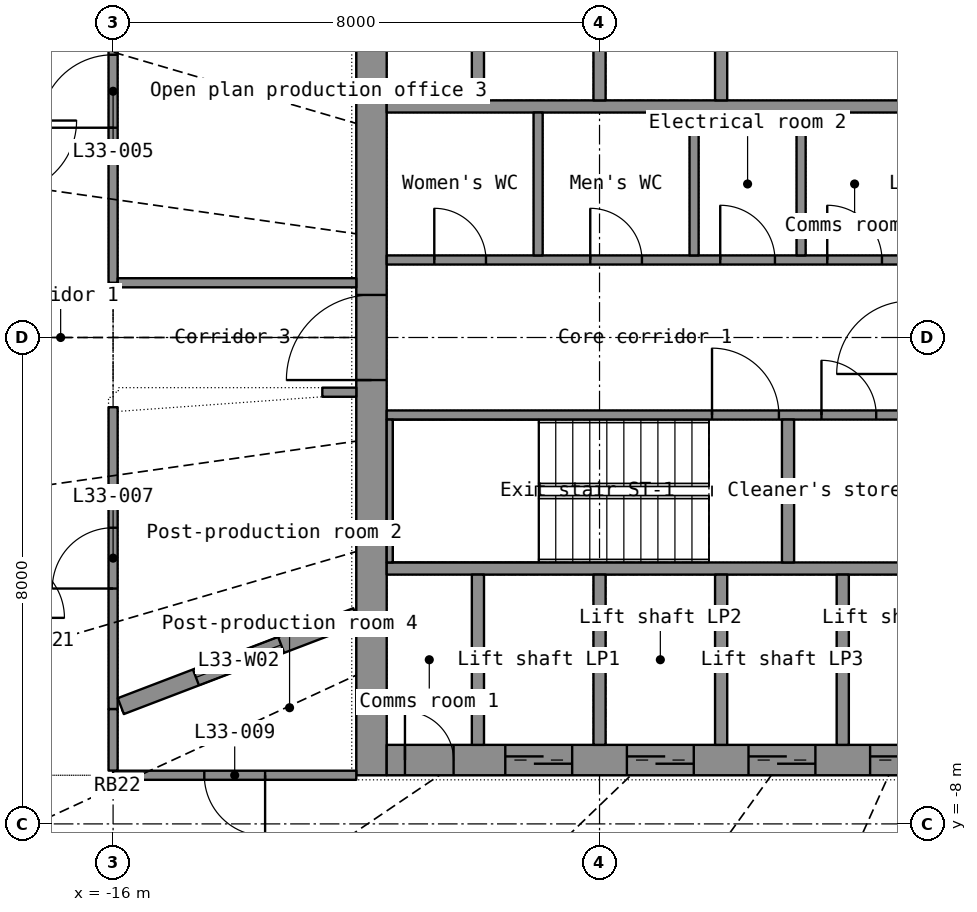
"""IFC4 building model, lengths in metres.
Left out: names, types, materials, properties, quantities, classifications, styles, units other than length and angle.
Written with IfcOpenShell. Run it as: python <this file> out.ifc"""

import sys

from ifc_helpers import new_model, si_unit, direction, frame, frame_2d, origin, place, context, subcontext, project, spatial, rectangle, extrude, element, fill, save


model = new_model("IFC4")
c1 = context("Model", 3, precision=1e-05, world=origin(), true_north=direction((0.0, 1.0)))
c2 = subcontext(c1, "Body", "Model", "MODEL_VIEW")
j1 = project(units=[si_unit("LENGTHUNIT", "METRE"), si_unit("PLANEANGLEUNIT", "RADIAN")], contexts=[c1])
p1 = place(None, origin())
s1 = spatial("IfcSite", under=j1, at=p1, CompositionType="ELEMENT")
p2 = place(p1, origin())
s2 = spatial("IfcBuilding", under=s1, at=p2, CompositionType="ELEMENT")
p3 = place(p2, frame((0.0, 0.0, 137.8)))
s3 = spatial("IfcBuildingStorey", under=s2, at=p3, CompositionType="ELEMENT", Elevation=137.8)
p4 = place(p3, frame((-11.75, -7.2, 0.0), z_axis=(0.0, 0.0, 1.0), x_axis=(0.0, 1.0, 0.0)))
e1 = element("IfcWall", 1, at=p4, inside=s3, PredefinedType="SHEAR", context=c2, shape_type="SweptSolid", body=[
    extrude(rectangle(XDim=14.4, YDim=0.5, at=frame_2d((7.2, 0.0))), origin(), (0.0, 0.0, 1.0), 3.3),
])
p5 = place(p4, frame((6.5, 0.0, 0.0)))
e2 = element("IfcOpeningElement", 2, at=p5, cuts=e1, PredefinedType="OPENING", context=c2, shape_type="SweptSolid", body=[
    extrude(rectangle(XDim=1.4, YDim=2.2, at=frame_2d((0.7, 1.1))), frame((0.0, 0.26, 0.0), z_axis=(0.0, -1.0, 0.0), x_axis=(1.0, 0.0, 0.0)), (0.0, 0.0, 1.0), 0.52),
])
p6 = place(p3, frame((-11.5, -6.95, 0.0), z_axis=(0.0, 0.0, 1.0), x_axis=(1.0, 0.0, 0.0)))
e3 = element("IfcWall", 3, at=p6, inside=s3, PredefinedType="SHEAR", context=c2, shape_type="SweptSolid", body=[
    extrude(rectangle(XDim=23.0, YDim=0.5, at=frame_2d((11.5, 0.0))), origin(), (0.0, 0.0, 1.0), 3.3),
])
p7 = place(p6, frame((1.95, 0.0, 0.0)))
e4 = element("IfcOpeningElement", 4, at=p7, cuts=e3, PredefinedType="OPENING", context=c2, shape_type="SweptSolid", body=[
    extrude(rectangle(XDim=1.1, YDim=2.2, at=frame_2d((0.55, 1.1))), frame((0.0, 0.26, 0.0), z_axis=(0.0, -1.0, 0.0), x_axis=(1.0, 0.0, 0.0)), (0.0, 0.0, 1.0), 0.52),
])
p8 = place(p6, frame((3.95, 0.0, 0.0)))
e5 = element("IfcOpeningElement", 5, at=p8, cuts=e3, PredefinedType="OPENING", context=c2, shape_type="SweptSolid", body=[
    extrude(rectangle(XDim=1.1, YDim=2.2, at=frame_2d((0.55, 1.1))), frame((0.0, 0.26, 0.0), z_axis=(0.0, -1.0, 0.0), x_axis=(1.0, 0.0, 0.0)), (0.0, 0.0, 1.0), 0.52),
])
p9 = place(p6, frame((5.95, 0.0, 0.0)))
e6 = element("IfcOpeningElement", 6, at=p9, cuts=e3, PredefinedType="OPENING", context=c2, shape_type="SweptSolid", body=[
    extrude(rectangle(XDim=1.1, YDim=2.2, at=frame_2d((0.55, 1.1))), frame((0.0, 0.26, 0.0), z_axis=(0.0, -1.0, 0.0), x_axis=(1.0, 0.0, 0.0)), (0.0, 0.0, 1.0), 0.52),
])
p10 = place(p6, frame((7.95, 0.0, 0.0)))
e7 = element("IfcOpeningElement", 7, at=p10, cuts=e3, PredefinedType="OPENING", context=c2, shape_type="SweptSolid", body=[
    extrude(rectangle(XDim=1.1, YDim=2.2, at=frame_2d((0.55, 1.1))), frame((0.0, 0.26, 0.0), z_axis=(0.0, -1.0, 0.0), x_axis=(1.0, 0.0, 0.0)), (0.0, 0.0, 1.0), 0.52),
])
p11 = place(p6, frame((9.95, 0.0, 0.0)))
e8 = element("IfcOpeningElement", 8, at=p11, cuts=e3, PredefinedType="OPENING", context=c2, shape_type="SweptSolid", body=[
    extrude(rectangle(XDim=1.1, YDim=2.2, at=frame_2d((0.55, 1.1))), frame((0.0, 0.26, 0.0), z_axis=(0.0, -1.0, 0.0), x_axis=(1.0, 0.0, 0.0)), (0.0, 0.0, 1.0), 0.52),
])
p12 = place(p6, frame((11.95, 0.0, 0.0)))
e9 = element("IfcOpeningElement", 9, at=p12, cuts=e3, PredefinedType="OPENING", context=c2, shape_type="SweptSolid", body=[
    extrude(rectangle(XDim=1.1, YDim=2.2, at=frame_2d((0.55, 1.1))), frame((0.0, 0.26, 0.0), z_axis=(0.0, -1.0, 0.0), x_axis=(1.0, 0.0, 0.0)), (0.0, 0.0, 1.0), 0.52),
])
p13 = place(p6, frame((13.95, 0.0, 0.0)))
e10 = element("IfcOpeningElement", 10, at=p13, cuts=e3, PredefinedType="OPENING", context=c2, shape_type="SweptSolid", body=[
    extrude(rectangle(XDim=1.1, YDim=2.2, at=frame_2d((0.55, 1.1))), frame((0.0, 0.26, 0.0), z_axis=(0.0, -1.0, 0.0), x_axis=(1.0, 0.0, 0.0)), (0.0, 0.0, 1.0), 0.52),
])
p14 = place(p6, frame((15.95, 0.0, 0.0)))
e11 = element("IfcOpeningElement", 11, at=p14, cuts=e3, PredefinedType="OPENING", context=c2, shape_type="SweptSolid", body=[
    extrude(rectangle(XDim=1.1, YDim=2.2, at=frame_2d((0.55, 1.1))), frame((0.0, 0.26, 0.0), z_axis=(0.0, -1.0, 0.0), x_axis=(1.0, 0.0, 0.0)), (0.0, 0.0, 1.0), 0.52),
])
p15 = place(p6, frame((19.95, 0.0, 0.0)))
e12 = element("IfcOpeningElement", 12, at=p15, cuts=e3, PredefinedType="OPENING", context=c2, shape_type="SweptSolid", body=[
    extrude(rectangle(XDim=1.1, YDim=2.2, at=frame_2d((0.55, 1.1))), frame((0.0, 0.26, 0.0), z_axis=(0.0, -1.0, 0.0), x_axis=(1.0, 0.0, 0.0)), (0.0, 0.0, 1.0), 0.52),
])
p16 = place(p6, frame((0.3, 0.0, 0.0)))
e13 = element("IfcOpeningElement", 13, at=p16, cuts=e3, PredefinedType="OPENING", context=c2, shape_type="SweptSolid", body=[
    extrude(rectangle(XDim=0.8, YDim=2.05, at=frame_2d((0.4, 1.025))), frame((0.0, 0.26, 0.0), z_axis=(0.0, -1.0, 0.0), x_axis=(1.0, 0.0, 0.0)), (0.0, 0.0, 1.0), 0.52),
])
p17 = place(p6, frame((21.9, 0.0, 0.0)))
e14 = element("IfcOpeningElement", 14, at=p17, cuts=e3, PredefinedType="OPENING", context=c2, shape_type="SweptSolid", body=[
    extrude(rectangle(XDim=0.8, YDim=2.05, at=frame_2d((0.4, 1.025))), frame((0.0, 0.26, 0.0), z_axis=(0.0, -1.0, 0.0), x_axis=(1.0, 0.0, 0.0)), (0.0, 0.0, 1.0), 0.52),
])
for number, where, z_axis, x_axis in (
    (15, (-11.5, -3.8, 0.0), (0.0, 0.0, 1.0), (1.0, 0.0, 0.0)),
    (16, (-11.5, 3.8, 0.0), (0.0, 0.0, 1.0), (1.0, 0.0, 0.0)),
):
    element("IfcWall", number, at=place(p3, frame(where, z_axis=z_axis, x_axis=x_axis)), inside=s3, PredefinedType="SHEAR", context=c2, shape_type="SweptSolid", body=[
        extrude(rectangle(XDim=23.0, YDim=0.2, at=frame_2d((11.5, 0.0))), origin(), (0.0, 0.0, 1.0), 3.3),
    ])
for number, where, z_axis, x_axis in (
    (17, (-10.0, -6.7, 0.0), (0.0, 0.0, 1.0), (0.0, 1.0, 0.0)),
    (18, (-8.0, -6.7, 0.0), (0.0, 0.0, 1.0), (0.0, 1.0, 0.0)),
    (19, (-6.0, -6.7, 0.0), (0.0, 0.0, 1.0), (0.0, 1.0, 0.0)),
    (20, (-4.0, -6.7, 0.0), (0.0, 0.0, 1.0), (0.0, 1.0, 0.0)),
    (21, (-10.0, 3.9, 0.0), (0.0, 0.0, 1.0), (0.0, 1.0, 0.0)),
    (22, (-8.0, 3.9, 0.0), (0.0, 0.0, 1.0), (0.0, 1.0, 0.0)),
    (23, (-6.0, 3.9, 0.0), (0.0, 0.0, 1.0), (0.0, 1.0, 0.0)),
):
    element("IfcWall", number, at=place(p3, frame(where, z_axis=z_axis, x_axis=x_axis)), inside=s3, PredefinedType="SHEAR", context=c2, shape_type="SweptSolid", body=[
        extrude(rectangle(XDim=2.8, YDim=0.2, at=frame_2d((1.4, 0.0))), origin(), (0.0, 0.0, 1.0), 3.3),
    ])
p18 = place(p3, frame((-11.5, -1.275, 0.0), z_axis=(0.0, 0.0, 1.0), x_axis=(1.0, 0.0, 0.0)))
e24 = element("IfcWall", 24, at=p18, inside=s3, PredefinedType="SHEAR", context=c2, shape_type="SweptSolid", body=[
    extrude(rectangle(XDim=8.5, YDim=0.15, at=frame_2d((4.25, 0.0))), origin(), (0.0, 0.0, 1.0), 3.3),
])
p19 = place(p18, frame((5.35, 0.0, 0.0)))
e25 = element("IfcOpeningElement", 25, at=p19, cuts=e24, PredefinedType="OPENING", context=c2, shape_type="SweptSolid", body=[
    extrude(rectangle(XDim=1.1, YDim=2.15, at=frame_2d((0.55, 1.075))), frame((0.0, 0.085, 0.0), z_axis=(0.0, -1.0, 0.0), x_axis=(1.0, 0.0, 0.0)), (0.0, 0.0, 1.0), 0.17),
])
p20 = place(p18, frame((7.15, 0.0, 0.0)))
e26 = element("IfcOpeningElement", 26, at=p20, cuts=e24, PredefinedType="OPENING", context=c2, shape_type="SweptSolid", body=[
    extrude(rectangle(XDim=0.9, YDim=2.1, at=frame_2d((0.45, 1.05))), frame((0.0, 0.085, 0.0), z_axis=(0.0, -1.0, 0.0), x_axis=(1.0, 0.0, 0.0)), (0.0, 0.0, 1.0), 0.17),
])
p21 = place(p3, frame((-11.5, 1.275, 0.0), z_axis=(0.0, 0.0, 1.0), x_axis=(1.0, 0.0, 0.0)))
e27 = element("IfcWall", 27, at=p21, inside=s3, PredefinedType="PARTITIONING", context=c2, shape_type="SweptSolid", body=[
    extrude(rectangle(XDim=8.5, YDim=0.15, at=frame_2d((4.25, 0.0))), origin(), (0.0, 0.0, 1.0), 3.3),
])
p22 = place(p21, frame((0.782, 0.0, 0.0)))
e28 = element("IfcOpeningElement", 28, at=p22, cuts=e27, PredefinedType="OPENING", context=c2, shape_type="SweptSolid", body=[
    extrude(rectangle(XDim=0.85, YDim=2.1, at=frame_2d((0.425, 1.05))), frame((0.0, 0.085, 0.0), z_axis=(0.0, -1.0, 0.0), x_axis=(1.0, 0.0, 0.0)), (0.0, 0.0, 1.0), 0.17),
])
p23 = place(p21, frame((3.347, 0.0, 0.0)))
e29 = element("IfcOpeningElement", 29, at=p23, cuts=e27, PredefinedType="OPENING", context=c2, shape_type="SweptSolid", body=[
    extrude(rectangle(XDim=0.85, YDim=2.1, at=frame_2d((0.425, 1.05))), frame((0.0, 0.085, 0.0), z_axis=(0.0, -1.0, 0.0), x_axis=(1.0, 0.0, 0.0)), (0.0, 0.0, 1.0), 0.17),
])
p24 = place(p21, frame((5.485, 0.0, 0.0)))
e30 = element("IfcOpeningElement", 30, at=p24, cuts=e27, PredefinedType="OPENING", context=c2, shape_type="SweptSolid", body=[
    extrude(rectangle(XDim=0.9, YDim=2.1, at=frame_2d((0.45, 1.05))), frame((0.0, 0.085, 0.0), z_axis=(0.0, -1.0, 0.0), x_axis=(1.0, 0.0, 0.0)), (0.0, 0.0, 1.0), 0.17),
])
p25 = place(p21, frame((7.245, 0.0, 0.0)))
e31 = element("IfcOpeningElement", 31, at=p25, cuts=e27, PredefinedType="OPENING", context=c2, shape_type="SweptSolid", body=[
    extrude(rectangle(XDim=0.9, YDim=2.1, at=frame_2d((0.45, 1.05))), frame((0.0, 0.085, 0.0), z_axis=(0.0, -1.0, 0.0), x_axis=(1.0, 0.0, 0.0)), (0.0, 0.0, 1.0), 0.17),
])
p26 = place(p3, frame((-11.45, -3.7, 0.0), z_axis=(0.0, 0.0, 1.0), x_axis=(0.0, 1.0, 0.0)))
e32 = element("IfcWall", 32, at=p26, inside=s3, PredefinedType="SHEAR", context=c2, shape_type="SweptSolid", body=[
    extrude(rectangle(XDim=2.35, YDim=0.1, at=frame_2d((1.175, 0.0))), origin(), (0.0, 0.0, 1.0), 3.3),
])
p27 = place(p3, frame((-4.9, -3.7, 0.0), z_axis=(0.0, 0.0, 1.0), x_axis=(0.0, 1.0, 0.0)))
e33 = element("IfcWall", 33, at=p27, inside=s3, PredefinedType="SHEAR", context=c2, shape_type="SweptSolid", body=[
    extrude(rectangle(XDim=2.35, YDim=0.2, at=frame_2d((1.175, 0.0))), origin(), (0.0, 0.0, 1.0), 3.3),
])
for number, where, z_axis, x_axis in (
    (34, (-9.01, 1.35, 0.0), (0.0, 0.0, 1.0), (0.0, 1.0, 0.0)),
    (35, (-6.445, 1.35, 0.0), (0.0, 0.0, 1.0), (0.0, 1.0, 0.0)),
    (36, (-4.685, 1.35, 0.0), (0.0, 0.0, 1.0), (0.0, 1.0, 0.0)),
):
    element("IfcWall", number, at=place(p3, frame(where, z_axis=z_axis, x_axis=x_axis)), inside=s3, PredefinedType="PARTITIONING", context=c2, shape_type="SweptSolid", body=[
        extrude(rectangle(XDim=2.35, YDim=0.15, at=frame_2d((1.175, 0.0))), origin(), (0.0, 0.0, 1.0), 3.3),
    ])
p28 = place(p3, frame((-16.0, 0.9, 0.0), z_axis=(0.0, 0.0, 1.0), x_axis=(0.0, 1.0, 0.0)))
e37 = element("IfcWall", 37, at=p28, inside=s3, PredefinedType="PARTITIONING", context=c2, shape_type="SweptSolid", body=[
    extrude(rectangle(XDim=6.3, YDim=0.15, at=frame_2d((3.15, 0.0))), origin(), (0.0, 0.0, 1.0), 2.4),
])
p29 = place(p28, frame((2.55, 0.0, 0.0)))
e38 = element("IfcOpeningElement", 38, at=p29, cuts=e37, PredefinedType="OPENING", context=c2, shape_type="SweptSolid", body=[
    extrude(rectangle(XDim=1.2, YDim=2.2, at=frame_2d((0.6, 1.1))), frame((0.0, 0.085, 0.0), z_axis=(0.0, -1.0, 0.0), x_axis=(1.0, 0.0, 0.0)), (0.0, 0.0, 1.0), 0.17),
])
p30 = place(p3, frame((-16.0, -6.111, 0.0), z_axis=(0.0, 0.0, 1.0), x_axis=(0.0, 1.0, 0.0)))
e39 = element("IfcWall", 39, at=p30, inside=s3, PredefinedType="PARTITIONING", context=c2, shape_type="SweptSolid", body=[
    extrude(rectangle(XDim=4.965, YDim=0.15, at=frame_2d((2.482, 0.0))), origin(), (0.0, 0.0, 1.0), 2.4),
])
p31 = place(p30, frame((1.982, 0.0, 0.0)))
e40 = element("IfcOpeningElement", 40, at=p31, cuts=e39, PredefinedType="OPENING", context=c2, shape_type="SweptSolid", body=[
    extrude(rectangle(XDim=1.0, YDim=2.2, at=frame_2d((0.5, 1.1))), frame((0.0, 0.085, 0.0), z_axis=(0.0, -1.0, 0.0), x_axis=(1.0, 0.0, 0.0)), (0.0, 0.0, 1.0), 0.17),
])
p32 = place(p3, frame((-15.873, -6.063, 0.0), z_axis=(0.0, 0.0, 1.0), x_axis=(0.934170215, 0.356827703, 0.0)))
e41 = element("IfcWall", 41, at=p32, inside=s3, PredefinedType="PARTITIONING", context=c2, shape_type="SweptSolid", body=[
    extrude(rectangle(XDim=4.146, YDim=0.28, at=frame_2d((2.073, 0.0))), origin(), (0.0, 0.0, 1.0), 2.4),
])
p33 = place(p32, frame((1.323, 0.0, 1.0)))
e42 = element("IfcOpeningElement", 42, at=p33, cuts=e41, PredefinedType="OPENING", context=c2, shape_type="SweptSolid", body=[
    extrude(rectangle(XDim=1.5, YDim=1.2, at=frame_2d((0.75, 0.6))), frame((0.0, 0.15, 0.0), z_axis=(0.0, -1.0, 0.0), x_axis=(1.0, 0.0, 0.0)), (0.0, 0.0, 1.0), 0.3),
])
p34 = place(p3, frame((-12.0, -7.2, 0.0), z_axis=(0.0, 0.0, 1.0), x_axis=(-1.0, 0.0, 0.0)))
e43 = element("IfcWall", 43, at=p34, inside=s3, PredefinedType="PARTITIONING", context=c2, shape_type="SweptSolid", body=[
    extrude(rectangle(XDim=4.0, YDim=0.15, at=frame_2d((2.0, 0.0))), origin(), (0.0, 0.0, 1.0), 2.4),
])
p35 = place(p34, frame((1.5, 0.0, 0.0)))
e44 = element("IfcOpeningElement", 44, at=p35, cuts=e43, PredefinedType="OPENING", context=c2, shape_type="SweptSolid", body=[
    extrude(rectangle(XDim=1.0, YDim=2.2, at=frame_2d((0.5, 1.1))), frame((0.0, 0.085, 0.0), z_axis=(0.0, -1.0, 0.0), x_axis=(1.0, 0.0, 0.0)), (0.0, 0.0, 1.0), 0.17),
])
p36 = place(p3, frame((-12.0, 0.9, 0.0), z_axis=(0.0, 0.0, 1.0), x_axis=(-1.0, 0.0, 0.0)))
e45 = element("IfcWall", 45, at=p36, inside=s3, PredefinedType="PARTITIONING", context=c2, shape_type="SweptSolid", body=[
    extrude(rectangle(XDim=3.923, YDim=0.15, at=frame_2d((1.961, 0.0))), origin(), (0.0, 0.0, 1.0), 2.4),
])
p37 = place(p3, frame((-16.0, -7.123, 0.0), z_axis=(0.0, 0.0, 1.0), x_axis=(0.0, 1.0, 0.0)))
e46 = element("IfcWall", 46, at=p37, inside=s3, PredefinedType="PARTITIONING", context=c2, shape_type="SweptSolid", body=[
    extrude(rectangle(XDim=1.011, YDim=0.15, at=frame_2d((0.505, 0.0))), origin(), (0.0, 0.0, 1.0), 2.4),
])
p38 = place(p3, frame((-12.559, -0.9, 0.0), z_axis=(0.0, 0.0, 1.0), x_axis=(1.0, 0.0, 0.0)))
e47 = element("IfcWall", 47, at=p38, inside=s3, PredefinedType="PARTITIONING", context=c2, shape_type="SweptSolid", body=[
    extrude(rectangle(XDim=0.559, YDim=0.15, at=frame_2d((0.279, 0.0))), origin(), (0.0, 0.0, 1.0), 2.4),
])
p39 = place(p7, origin())
e48 = element("IfcDoor", 48, at=p39, inside=s3, OperationType="DOUBLE_DOOR_SLIDING", PredefinedType="DOOR", context=c2, shape_type="SweptSolid", body=[
    extrude(rectangle(XDim=1.1, YDim=2.2, at=frame_2d((0.55, 1.1))), frame((0.0, 0.025, 0.0), z_axis=(0.0, -1.0, 0.0), x_axis=(1.0, 0.0, 0.0)), (0.0, 0.0, 1.0), 0.05),
])
fill(e4, e48)
p40 = place(p8, origin())
e49 = element("IfcDoor", 49, at=p40, inside=s3, OperationType="DOUBLE_DOOR_SLIDING", PredefinedType="DOOR", context=c2, shape_type="SweptSolid", body=[
    extrude(rectangle(XDim=1.1, YDim=2.2, at=frame_2d((0.55, 1.1))), frame((0.0, 0.025, 0.0), z_axis=(0.0, -1.0, 0.0), x_axis=(1.0, 0.0, 0.0)), (0.0, 0.0, 1.0), 0.05),
])
fill(e5, e49)
p41 = place(p9, origin())
e50 = element("IfcDoor", 50, at=p41, inside=s3, OperationType="DOUBLE_DOOR_SLIDING", PredefinedType="DOOR", context=c2, shape_type="SweptSolid", body=[
    extrude(rectangle(XDim=1.1, YDim=2.2, at=frame_2d((0.55, 1.1))), frame((0.0, 0.025, 0.0), z_axis=(0.0, -1.0, 0.0), x_axis=(1.0, 0.0, 0.0)), (0.0, 0.0, 1.0), 0.05),
])
fill(e6, e50)
p42 = place(p10, origin())
e51 = element("IfcDoor", 51, at=p42, inside=s3, OperationType="DOUBLE_DOOR_SLIDING", PredefinedType="DOOR", context=c2, shape_type="SweptSolid", body=[
    extrude(rectangle(XDim=1.1, YDim=2.2, at=frame_2d((0.55, 1.1))), frame((0.0, 0.025, 0.0), z_axis=(0.0, -1.0, 0.0), x_axis=(1.0, 0.0, 0.0)), (0.0, 0.0, 1.0), 0.05),
])
fill(e7, e51)
p43 = place(p16, origin())
e52 = element("IfcDoor", 52, at=p43, inside=s3, OperationType="SINGLE_SWING_LEFT", PredefinedType="DOOR", context=c2, shape_type="SweptSolid", body=[
    extrude(rectangle(XDim=0.8, YDim=2.05, at=frame_2d((0.4, 1.025))), frame((0.0, 0.025, 0.0), z_axis=(0.0, -1.0, 0.0), x_axis=(1.0, 0.0, 0.0)), (0.0, 0.0, 1.0), 0.05),
])
fill(e13, e52)
p44 = place(p5, origin())
e53 = element("IfcDoor", 53, at=p44, inside=s3, OperationType="DOUBLE_DOOR_SINGLE_SWING", PredefinedType="DOOR", context=c2, shape_type="SweptSolid", body=[
    extrude(rectangle(XDim=1.4, YDim=2.2, at=frame_2d((0.7, 1.1))), frame((0.0, 0.025, 0.0), z_axis=(0.0, -1.0, 0.0), x_axis=(1.0, 0.0, 0.0)), (0.0, 0.0, 1.0), 0.05),
])
fill(e2, e53)
p45 = place(p19, origin())
e54 = element("IfcDoor", 54, at=p45, inside=s3, OperationType="SINGLE_SWING_LEFT", PredefinedType="DOOR", context=c2, shape_type="SweptSolid", body=[
    extrude(rectangle(XDim=1.1, YDim=2.15, at=frame_2d((0.55, 1.075))), frame((0.0, 0.025, 0.0), z_axis=(0.0, -1.0, 0.0), x_axis=(1.0, 0.0, 0.0)), (0.0, 0.0, 1.0), 0.05),
])
fill(e25, e54)
p46 = place(p22, origin())
e55 = element("IfcDoor", 55, at=p46, inside=s3, OperationType="SINGLE_SWING_LEFT", PredefinedType="DOOR", context=c2, shape_type="SweptSolid", body=[
    extrude(rectangle(XDim=0.85, YDim=2.1, at=frame_2d((0.425, 1.05))), frame((0.0, 0.025, 0.0), z_axis=(0.0, -1.0, 0.0), x_axis=(1.0, 0.0, 0.0)), (0.0, 0.0, 1.0), 0.05),
])
fill(e28, e55)
p47 = place(p23, origin())
e56 = element("IfcDoor", 56, at=p47, inside=s3, OperationType="SINGLE_SWING_LEFT", PredefinedType="DOOR", context=c2, shape_type="SweptSolid", body=[
    extrude(rectangle(XDim=0.85, YDim=2.1, at=frame_2d((0.425, 1.05))), frame((0.0, 0.025, 0.0), z_axis=(0.0, -1.0, 0.0), x_axis=(1.0, 0.0, 0.0)), (0.0, 0.0, 1.0), 0.05),
])
fill(e29, e56)
p48 = place(p24, origin())
e57 = element("IfcDoor", 57, at=p48, inside=s3, OperationType="SINGLE_SWING_LEFT", PredefinedType="DOOR", context=c2, shape_type="SweptSolid", body=[
    extrude(rectangle(XDim=0.9, YDim=2.1, at=frame_2d((0.45, 1.05))), frame((0.0, 0.025, 0.0), z_axis=(0.0, -1.0, 0.0), x_axis=(1.0, 0.0, 0.0)), (0.0, 0.0, 1.0), 0.05),
])
fill(e30, e57)
p49 = place(p25, origin())
e58 = element("IfcDoor", 58, at=p49, inside=s3, OperationType="SINGLE_SWING_LEFT", PredefinedType="DOOR", context=c2, shape_type="SweptSolid", body=[
    extrude(rectangle(XDim=0.9, YDim=2.1, at=frame_2d((0.45, 1.05))), frame((0.0, 0.025, 0.0), z_axis=(0.0, -1.0, 0.0), x_axis=(1.0, 0.0, 0.0)), (0.0, 0.0, 1.0), 0.05),
])
fill(e31, e58)
p50 = place(p20, origin())
e59 = element("IfcDoor", 59, at=p50, inside=s3, OperationType="SINGLE_SWING_LEFT", PredefinedType="DOOR", context=c2, shape_type="SweptSolid", body=[
    extrude(rectangle(XDim=0.9, YDim=2.1, at=frame_2d((0.45, 1.05))), frame((0.0, 0.025, 0.0), z_axis=(0.0, -1.0, 0.0), x_axis=(1.0, 0.0, 0.0)), (0.0, 0.0, 1.0), 0.05),
])
fill(e26, e59)
p51 = place(p29, origin())
e60 = element("IfcDoor", 60, at=p51, inside=s3, OperationType="DOUBLE_DOOR_SINGLE_SWING", PredefinedType="DOOR", context=c2, shape_type="SweptSolid", body=[
    extrude(rectangle(XDim=1.2, YDim=2.2, at=frame_2d((0.6, 1.1))), frame((0.0, 0.025, 0.0), z_axis=(0.0, -1.0, 0.0), x_axis=(1.0, 0.0, 0.0)), (0.0, 0.0, 1.0), 0.05),
])
fill(e38, e60)
p52 = place(p31, origin())
e61 = element("IfcDoor", 61, at=p52, inside=s3, OperationType="SINGLE_SWING_LEFT", PredefinedType="DOOR", context=c2, shape_type="SweptSolid", body=[
    extrude(rectangle(XDim=1.0, YDim=2.2, at=frame_2d((0.5, 1.1))), frame((0.0, 0.025, 0.0), z_axis=(0.0, -1.0, 0.0), x_axis=(1.0, 0.0, 0.0)), (0.0, 0.0, 1.0), 0.05),
])
fill(e40, e61)
p53 = place(p35, origin())
e62 = element("IfcDoor", 62, at=p53, inside=s3, OperationType="SINGLE_SWING_LEFT", PredefinedType="DOOR", context=c2, shape_type="SweptSolid", body=[
    extrude(rectangle(XDim=1.0, YDim=2.2, at=frame_2d((0.5, 1.1))), frame((0.0, 0.025, 0.0), z_axis=(0.0, -1.0, 0.0), x_axis=(1.0, 0.0, 0.0)), (0.0, 0.0, 1.0), 0.05),
])
fill(e44, e62)
p54 = place(p33, origin())
e63 = element("IfcWindow", 63, at=p54, inside=s3, PartitioningType="SINGLE_PANEL", PredefinedType="WINDOW", context=c2, shape_type="SweptSolid", body=[
    extrude(rectangle(XDim=1.5, YDim=1.2, at=frame_2d((0.75, 0.6))), frame((0.0, 0.03, 0.0), z_axis=(0.0, -1.0, 0.0), x_axis=(1.0, 0.0, 0.0)), (0.0, 0.0, 1.0), 0.06),
])
fill(e42, e63)
save(model, sys.argv[1])
